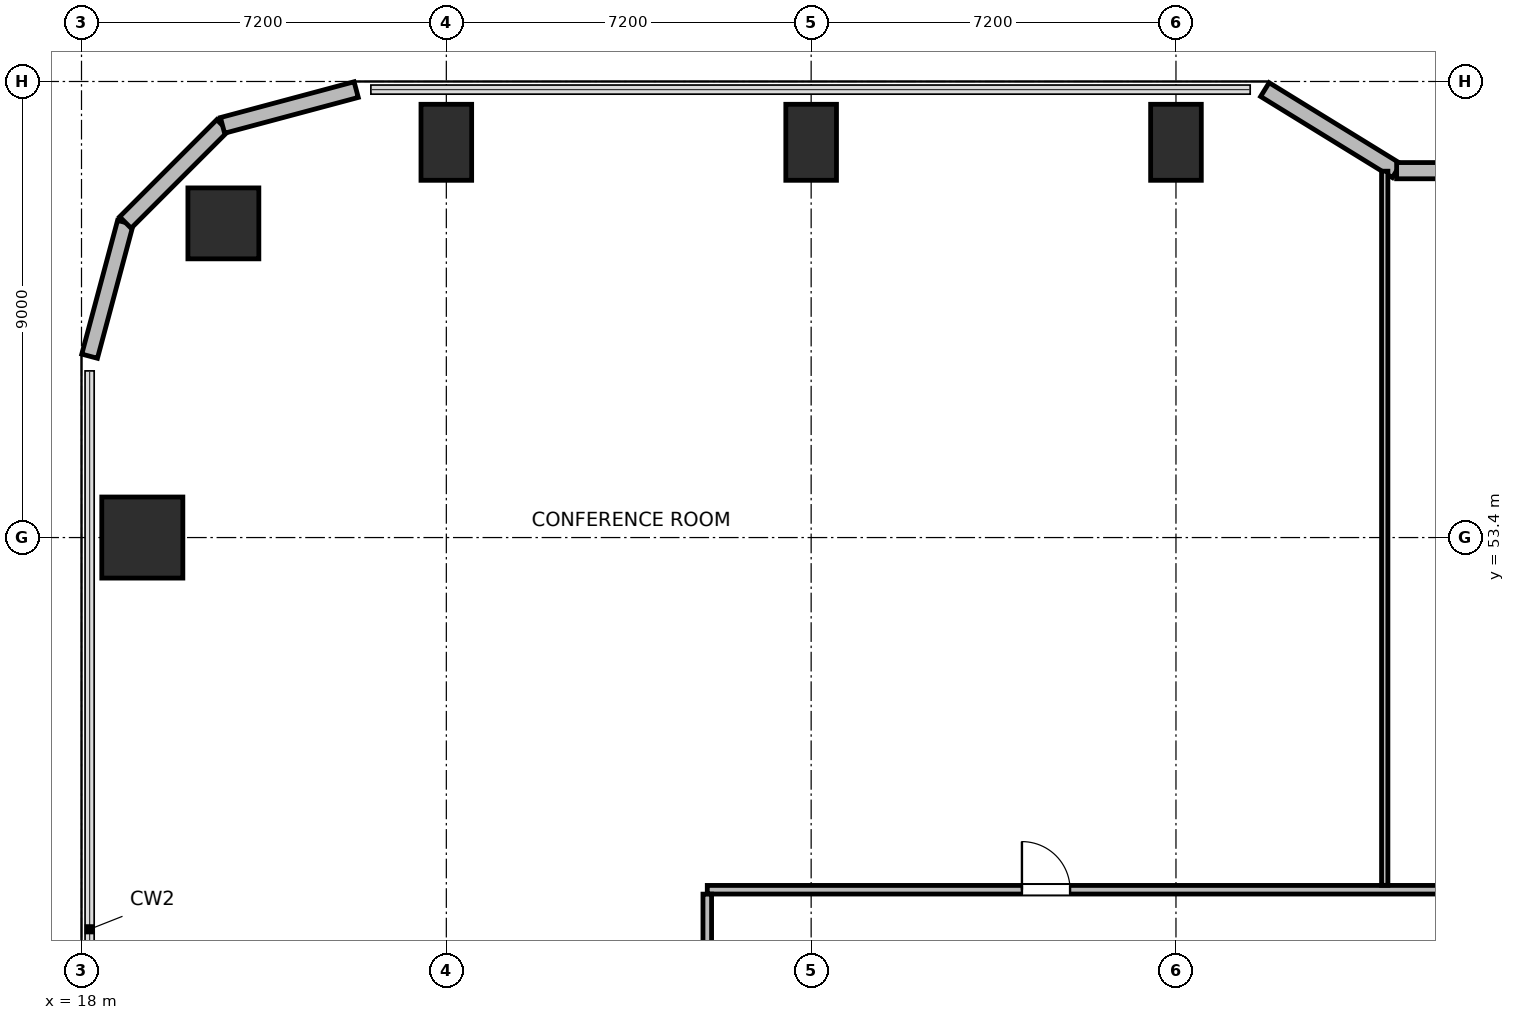
"""IFC4 building model, lengths in metres.
Left out: names, types, materials, properties, quantities, classifications, styles, units other than length and angle.
Written with IfcOpenShell. Run it as: python <this file> out.ifc"""

import sys

from ifc_helpers import new_model, si_unit, direction, frame, frame_2d, origin, origin_2d, place, context, subcontext, project, spatial, rectangle, circle, extrude, element, fill, save


model = new_model("IFC4")
c1 = context("Model", 3, precision=1e-05, world=origin(), true_north=direction((0.0, 1.0)))
c2 = subcontext(c1, "Body", "Model", "MODEL_VIEW")
j1 = project(units=[si_unit("LENGTHUNIT", "METRE"), si_unit("PLANEANGLEUNIT", "RADIAN")], contexts=[c1])
p1 = place(None, origin())
s1 = spatial("IfcSite", under=j1, at=p1, CompositionType="ELEMENT")
p2 = place(p1, origin())
s2 = spatial("IfcBuilding", under=s1, at=p2, CompositionType="ELEMENT")
p3 = place(p2, frame((0.0, 0.0, 25.5)))
s3 = spatial("IfcBuildingStorey", under=s2, at=p3, CompositionType="ELEMENT", Elevation=25.5)
p4 = place(p3, frame((20.8, 59.6, 0.0), z_axis=(0.0, 0.0, 1.0), x_axis=(1.0, 0.0, 0.0)))
e1 = element("IfcColumn", 1, at=p4, inside=s3, PredefinedType="COLUMN", context=c2, shape_type="SweptSolid", body=[
    extrude(circle(Radius=0.7, at=origin_2d()), origin(), (0.0, 0.0, 1.0), 3.9),
])
for number, where, z_axis, x_axis in (
    (2, (25.2, 61.2, 0.0), (0.0, 0.0, 1.0), (1.0, 0.0, 0.0)),
    (3, (32.4, 61.2, 0.0), (0.0, 0.0, 1.0), (1.0, 0.0, 0.0)),
    (4, (39.6, 61.2, 0.0), (0.0, 0.0, 1.0), (1.0, 0.0, 0.0)),
):
    element("IfcColumn", number, at=place(p3, frame(where, z_axis=z_axis, x_axis=x_axis)), inside=s3, PredefinedType="COLUMN", context=c2, shape_type="SweptSolid", body=[
        extrude(rectangle(XDim=1.0, YDim=1.5, at=origin_2d()), origin(), (0.0, 0.0, 1.0), 3.9),
    ])
p5 = place(p3, frame((19.2, 53.4, 0.0), z_axis=(0.0, 0.0, 1.0), x_axis=(1.0, 0.0, 0.0)))
e5 = element("IfcColumn", 5, at=p5, inside=s3, PredefinedType="COLUMN", context=c2, shape_type="SweptSolid", body=[
    extrude(rectangle(XDim=1.6, YDim=1.6, at=origin_2d()), origin(), (0.0, 0.0, 1.0), 3.9),
])
p6 = place(p3, frame((18.16, 56.979, 0.0), z_axis=(0.0, 0.0, 1.0), x_axis=(0.25869736047, 0.965958423373, 0.0)))
e6 = element("IfcWall", 6, at=p6, inside=s3, PredefinedType="SOLIDWALL", context=c2, shape_type="SweptSolid", body=[
    extrude(rectangle(XDim=2.731, YDim=0.32, at=frame_2d((1.366, 0.0))), origin(), (0.0, 0.0, 1.0), 3.64),
])
p7 = place(p3, frame((18.866, 59.617, 0.0), z_axis=(0.0, 0.0, 1.0), x_axis=(0.707106781187, 0.707106781187, 0.0)))
e7 = element("IfcWall", 7, at=p7, inside=s3, PredefinedType="SOLIDWALL", context=c2, shape_type="SweptSolid", body=[
    extrude(rectangle(XDim=2.71, YDim=0.32, at=frame_2d((1.355, 0.0))), origin(), (0.0, 0.0, 1.0), 3.64),
])
p8 = place(p3, frame((20.783, 61.533, 0.0), z_axis=(0.0, 0.0, 1.0), x_axis=(0.965964405026, 0.25867502435, 0.0)))
e8 = element("IfcWall", 8, at=p8, inside=s3, PredefinedType="SOLIDWALL", context=c2, shape_type="SweptSolid", body=[
    extrude(rectangle(XDim=2.731, YDim=0.32, at=frame_2d((1.366, 0.0))), origin(), (0.0, 0.0, 1.0), 3.64),
])
p9 = place(p3, frame((41.355, 62.24, 0.0), z_axis=(0.0, 0.0, 1.0), x_axis=(0.851630857047, -0.524142044989, 0.0)))
e9 = element("IfcWall", 9, at=p9, inside=s3, PredefinedType="SOLIDWALL", context=c2, shape_type="SweptSolid", body=[
    extrude(rectangle(XDim=3.053, YDim=0.32, at=frame_2d((1.526, 0.0))), origin(), (0.0, 0.0, 1.0), 2.875),
])
p10 = place(p3, frame((43.955, 60.64, 0.0), z_axis=(0.0, 0.0, 1.0), x_axis=(1.0, 0.0, 0.0)))
e10 = element("IfcWall", 10, at=p10, inside=s3, PredefinedType="SOLIDWALL", context=c2, shape_type="SweptSolid", body=[
    extrude(rectangle(XDim=4.685, YDim=0.32, at=frame_2d((2.343, 0.0))), origin(), (0.0, 0.0, 1.0), 2.875),
])
p11 = place(p10, frame((1.443, 0.0, 0.85)))
e11 = element("IfcOpeningElement", 11, at=p11, cuts=e10, PredefinedType="OPENING", context=c2, shape_type="SweptSolid", body=[
    extrude(rectangle(XDim=1.8, YDim=1.1, at=frame_2d((0.9, 0.55))), frame((0.0, 0.17, 0.0), z_axis=(0.0, -1.0, 0.0), x_axis=(1.0, 0.0, 0.0)), (0.0, 0.0, 1.0), 0.34),
])
p12 = place(p3, frame((30.35, 46.45, 0.0), z_axis=(0.0, 0.0, 1.0), x_axis=(1.0, 0.0, 0.0)))
e12 = element("IfcWall", 12, at=p12, inside=s3, PredefinedType="PARTITIONING", context=c2, shape_type="SweptSolid", body=[
    extrude(rectangle(XDim=35.3, YDim=0.17, at=frame_2d((17.65, 0.0))), origin(), (0.0, 0.0, 1.0), 3.64),
])
p13 = place(p12, frame((6.21, 0.0, 0.0)))
e13 = element("IfcOpeningElement", 13, at=p13, cuts=e12, PredefinedType="OPENING", context=c2, shape_type="SweptSolid", body=[
    extrude(rectangle(XDim=0.95, YDim=2.04, at=frame_2d((0.475, 1.02))), frame((0.0, 0.095, 0.0), z_axis=(0.0, -1.0, 0.0), x_axis=(1.0, 0.0, 0.0)), (0.0, 0.0, 1.0), 0.19),
])
p14 = place(p12, frame((15.38, 0.0, 0.0)))
e14 = element("IfcOpeningElement", 14, at=p14, cuts=e12, PredefinedType="OPENING", context=c2, shape_type="SweptSolid", body=[
    extrude(rectangle(XDim=0.95, YDim=2.04, at=frame_2d((0.475, 1.02))), frame((0.0, 0.095, 0.0), z_axis=(0.0, -1.0, 0.0), x_axis=(1.0, 0.0, 0.0)), (0.0, 0.0, 1.0), 0.19),
])
p15 = place(p12, frame((26.345, 0.0, 0.0)))
e15 = element("IfcOpeningElement", 15, at=p15, cuts=e12, PredefinedType="OPENING", context=c2, shape_type="SweptSolid", body=[
    extrude(rectangle(XDim=0.95, YDim=2.04, at=frame_2d((0.475, 1.02))), frame((0.0, 0.095, 0.0), z_axis=(0.0, -1.0, 0.0), x_axis=(1.0, 0.0, 0.0)), (0.0, 0.0, 1.0), 0.19),
])
p16 = place(p3, frame((30.35, 25.637, 0.0), z_axis=(0.0, 0.0, 1.0), x_axis=(0.0, 1.0, 0.0)))
e16 = element("IfcWall", 16, at=p16, inside=s3, PredefinedType="PARTITIONING", context=c2, shape_type="SweptSolid", body=[
    extrude(rectangle(XDim=20.726, YDim=0.17, at=frame_2d((10.363, 0.0))), origin(), (0.0, 0.0, 1.0), 3.64),
])
p17 = place(p16, frame((4.263, 0.0, 0.0)))
e17 = element("IfcOpeningElement", 17, at=p17, cuts=e16, PredefinedType="OPENING", context=c2, shape_type="SweptSolid", body=[
    extrude(rectangle(XDim=0.95, YDim=2.04, at=frame_2d((0.475, 1.02))), frame((0.0, 0.095, 0.0), z_axis=(0.0, -1.0, 0.0), x_axis=(1.0, 0.0, 0.0)), (0.0, 0.0, 1.0), 0.19),
])
p18 = place(p16, frame((14.713, 0.0, 0.0)))
e18 = element("IfcOpeningElement", 18, at=p18, cuts=e16, PredefinedType="OPENING", context=c2, shape_type="SweptSolid", body=[
    extrude(rectangle(XDim=0.95, YDim=2.04, at=frame_2d((0.475, 1.02))), frame((0.0, 0.095, 0.0), z_axis=(0.0, -1.0, 0.0), x_axis=(1.0, 0.0, 0.0)), (0.0, 0.0, 1.0), 0.19),
])
p19 = place(p3, frame((43.72, 46.537, 0.0), z_axis=(0.0, 0.0, 1.0), x_axis=(0.0, 1.0, 0.0)))
e19 = element("IfcWall", 19, at=p19, inside=s3, PredefinedType="PARTITIONING", context=c2, shape_type="SweptSolid", body=[
    extrude(rectangle(XDim=14.093, YDim=0.125, at=frame_2d((7.046, 0.0))), origin(), (0.0, 0.0, 1.0), 3.003),
])
p20 = place(p13, origin())
e20 = element("IfcDoor", 20, at=p20, inside=s3, OperationType="SINGLE_SWING_LEFT", PredefinedType="DOOR", context=c2, shape_type="SweptSolid", body=[
    extrude(rectangle(XDim=0.95, YDim=2.04, at=frame_2d((0.475, 1.02))), frame((0.0, 0.025, 0.0), z_axis=(0.0, -1.0, 0.0), x_axis=(1.0, 0.0, 0.0)), (0.0, 0.0, 1.0), 0.05),
])
fill(e13, e20)
save(model, sys.argv[1])
